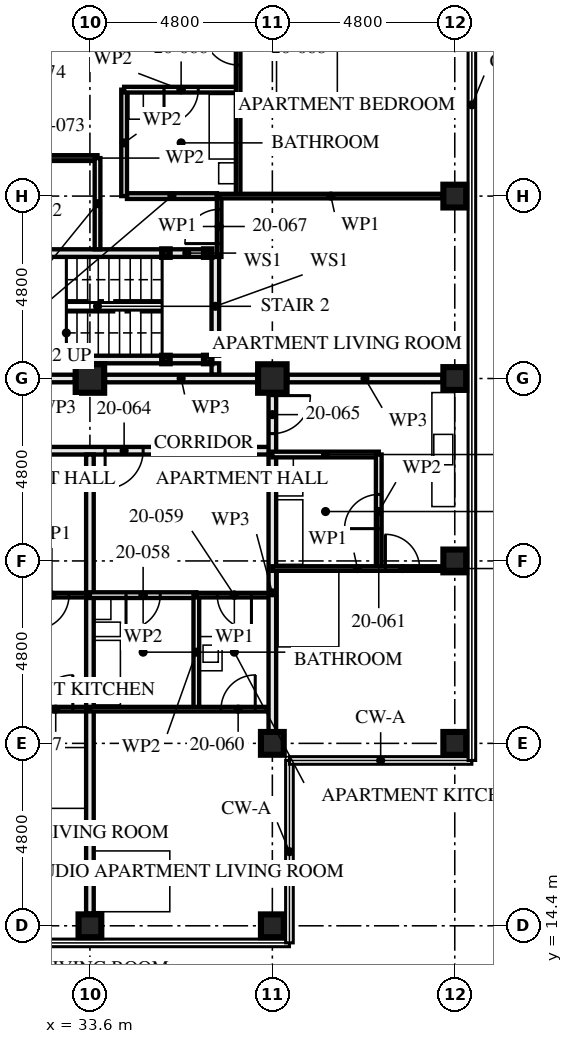
"""IFC4 building model, lengths in metres.
Left out: names, types, materials, properties, quantities, classifications, styles, units other than length and angle.
Written with IfcOpenShell. Run it as: python <this file> out.ifc"""

import sys

from ifc_helpers import new_model, si_unit, direction, frame, frame_2d, origin, origin_2d, place, context, subcontext, project, spatial, rectangle, hollow_rectangle, extrude, element, fill, save


model = new_model("IFC4")
c1 = context("Model", 3, precision=1e-05, world=origin(), true_north=direction((0.0, 1.0)))
c2 = subcontext(c1, "Body", "Model", "MODEL_VIEW")
j1 = project(units=[si_unit("LENGTHUNIT", "METRE"), si_unit("PLANEANGLEUNIT", "RADIAN")], contexts=[c1])
p1 = place(None, origin())
s1 = spatial("IfcSite", under=j1, at=p1, CompositionType="ELEMENT")
p2 = place(p1, origin())
s2 = spatial("IfcBuilding", under=s1, at=p2, CompositionType="ELEMENT")
p3 = place(p2, frame((0.0, 0.0, 76.0)))
s3 = spatial("IfcBuildingStorey", under=s2, at=p3, CompositionType="ELEMENT", Elevation=76.0)
p4 = place(p3, frame((33.6, 14.4, 0.0), z_axis=(0.0, 0.0, 1.0), x_axis=(0.0, 1.0, 0.0)))
e1 = element("IfcColumn", 1, at=p4, inside=s3, PredefinedType="COLUMN", context=c2, shape_type="SweptSolid", body=[
    extrude(hollow_rectangle(XDim=0.6, YDim=0.6, WallThickness=0.08, at=origin_2d()), origin(), (0.0, 0.0, 1.0), 3.5),
])
p5 = place(p3, frame((33.6, 28.8, 0.0), z_axis=(0.0, 0.0, 1.0), x_axis=(0.0, 1.0, 0.0)))
e2 = element("IfcColumn", 2, at=p5, inside=s3, PredefinedType="COLUMN", context=c2, shape_type="SweptSolid", body=[
    extrude(hollow_rectangle(XDim=0.75, YDim=0.75, WallThickness=0.08, at=origin_2d()), origin(), (0.0, 0.0, 1.0), 3.5),
])
for number, where, z_axis, x_axis in (
    (3, (38.4, 14.4, 0.0), (0.0, 0.0, 1.0), (0.0, 1.0, 0.0)),
    (4, (38.4, 19.2, 0.0), (0.0, 0.0, 1.0), (0.0, 1.0, 0.0)),
):
    element("IfcColumn", number, at=place(p3, frame(where, z_axis=z_axis, x_axis=x_axis)), inside=s3, PredefinedType="COLUMN", context=c2, shape_type="SweptSolid", body=[
        extrude(hollow_rectangle(XDim=0.6, YDim=0.6, WallThickness=0.08, at=origin_2d()), origin(), (0.0, 0.0, 1.0), 3.5),
    ])
p6 = place(p3, frame((38.4, 28.8, 0.0), z_axis=(0.0, 0.0, 1.0), x_axis=(0.0, 1.0, 0.0)))
e5 = element("IfcColumn", 5, at=p6, inside=s3, PredefinedType="COLUMN", context=c2, shape_type="SweptSolid", body=[
    extrude(hollow_rectangle(XDim=0.75, YDim=0.75, WallThickness=0.08, at=origin_2d()), origin(), (0.0, 0.0, 1.0), 3.5),
])
for number, where, z_axis, x_axis in (
    (6, (43.2, 19.2, 0.0), (0.0, 0.0, 1.0), (0.0, 1.0, 0.0)),
    (7, (43.2, 24.0, 0.0), (0.0, 0.0, 1.0), (1.0, 0.0, 0.0)),
    (8, (43.2, 28.8, 0.0), (0.0, 0.0, 1.0), (0.0, 1.0, 0.0)),
    (9, (43.2, 33.6, 0.0), (0.0, 0.0, 1.0), (1.0, 0.0, 0.0)),
):
    element("IfcColumn", number, at=place(p3, frame(where, z_axis=z_axis, x_axis=x_axis)), inside=s3, PredefinedType="COLUMN", context=c2, shape_type="SweptSolid", body=[
        extrude(hollow_rectangle(XDim=0.6, YDim=0.6, WallThickness=0.08, at=origin_2d()), origin(), (0.0, 0.0, 1.0), 3.5),
    ])
for number, where, z_axis, x_axis in (
    (10, (36.7, 29.3, 0.0), (0.0, 0.0, 1.0), (1.0, 0.0, 0.0)),
    (11, (36.7, 32.1, 0.0), (0.0, 0.0, 1.0), (1.0, 0.0, 0.0)),
    (12, (35.6, 29.3, 0.0), (0.0, 0.0, 1.0), (1.0, 0.0, 0.0)),
    (13, (35.6, 32.1, 0.0), (0.0, 0.0, 1.0), (1.0, 0.0, 0.0)),
):
    element("IfcColumn", number, at=place(p3, frame(where, z_axis=z_axis, x_axis=x_axis)), inside=s3, PredefinedType="COLUMN", context=c2, shape_type="SweptSolid", body=[
        extrude(hollow_rectangle(XDim=0.2, YDim=0.2, WallThickness=0.008, at=origin_2d()), origin(), (0.0, 0.0, 1.0), 3.25),
    ])
p7 = place(p3, frame((31.6, 23.1, 0.0), z_axis=(0.0, 0.0, 1.0), x_axis=(1.0, 0.0, 0.0)))
e14 = element("IfcWall", 14, at=p7, inside=s3, PredefinedType="PARTITIONING", context=c2, shape_type="SweptSolid", body=[
    extrude(rectangle(XDim=2.0, YDim=0.12, at=frame_2d((1.0, 0.0))), origin(), (0.0, 0.0, 1.0), 3.25),
])
p8 = place(p7, frame((0.55, 0.0, 0.0)))
e15 = element("IfcOpeningElement", 15, at=p8, cuts=e14, PredefinedType="OPENING", context=c2, shape_type="SweptSolid", body=[
    extrude(rectangle(XDim=0.9, YDim=2.1, at=frame_2d((0.45, 1.05))), frame((0.0, 0.071, 0.0), z_axis=(0.0, -1.0, 0.0), x_axis=(1.0, 0.0, 0.0)), (0.0, 0.0, 1.0), 0.141),
])
p9 = place(p3, frame((28.8, 20.1, 0.0), z_axis=(0.0, 0.0, 1.0), x_axis=(1.0, 0.0, 0.0)))
e16 = element("IfcWall", 16, at=p9, inside=s3, PredefinedType="PARTITIONING", context=c2, shape_type="SweptSolid", body=[
    extrude(rectangle(XDim=4.8, YDim=0.12, at=frame_2d((2.4, 0.0))), origin(), (0.0, 0.0, 1.0), 3.25),
])
p10 = place(p9, frame((3.45, 0.0, 0.0)))
e17 = element("IfcOpeningElement", 17, at=p10, cuts=e16, PredefinedType="OPENING", context=c2, shape_type="SweptSolid", body=[
    extrude(rectangle(XDim=0.9, YDim=2.1, at=frame_2d((0.45, 1.05))), frame((0.0, 0.071, 0.0), z_axis=(0.0, -1.0, 0.0), x_axis=(1.0, 0.0, 0.0)), (0.0, 0.0, 1.0), 0.141),
])
p11 = place(p3, frame((33.6, 14.72, 0.0), z_axis=(0.0, 0.0, 1.0), x_axis=(0.0, 1.0, 0.0)))
e18 = element("IfcWall", 18, at=p11, inside=s3, PredefinedType="PARTITIONING", context=c2, shape_type="SweptSolid", body=[
    extrude(rectangle(XDim=12.08, YDim=0.2, at=frame_2d((6.04, 0.0))), origin(), (0.0, 0.0, 1.0), 2.04),
])
p12 = place(p3, frame((36.4, 20.1, 0.0), z_axis=(0.0, 0.0, 1.0), x_axis=(0.0, 1.0, 0.0)))
e19 = element("IfcWall", 19, at=p12, inside=s3, PredefinedType="PARTITIONING", context=c2, shape_type="SweptSolid", body=[
    extrude(rectangle(XDim=3.0, YDim=0.15, at=frame_2d((1.5, 0.0))), origin(), (0.0, 0.0, 1.0), 3.25),
])
p13 = place(p3, frame((33.6, 23.1, 0.0), z_axis=(0.0, 0.0, 1.0), x_axis=(1.0, 0.0, 0.0)))
e20 = element("IfcWall", 20, at=p13, inside=s3, PredefinedType="PARTITIONING", context=c2, shape_type="SweptSolid", body=[
    extrude(rectangle(XDim=2.8, YDim=0.15, at=frame_2d((1.4, 0.0))), origin(), (0.0, 0.0, 1.0), 3.25),
])
p14 = place(p13, frame((0.95, 0.0, 0.0)))
e21 = element("IfcOpeningElement", 21, at=p14, cuts=e20, PredefinedType="OPENING", context=c2, shape_type="SweptSolid", body=[
    extrude(rectangle(XDim=0.9, YDim=2.1, at=frame_2d((0.45, 1.05))), frame((0.0, 0.085, 0.0), z_axis=(0.0, -1.0, 0.0), x_axis=(1.0, 0.0, 0.0)), (0.0, 0.0, 1.0), 0.171),
])
p15 = place(p3, frame((36.4, 23.1, 0.0), z_axis=(0.0, 0.0, 1.0), x_axis=(1.0, 0.0, 0.0)))
e22 = element("IfcWall", 22, at=p15, inside=s3, PredefinedType="PARTITIONING", context=c2, shape_type="SweptSolid", body=[
    extrude(rectangle(XDim=2.0, YDim=0.12, at=frame_2d((1.0, 0.0))), origin(), (0.0, 0.0, 1.0), 3.25),
])
p16 = place(p15, frame((0.55, 0.0, 0.0)))
e23 = element("IfcOpeningElement", 23, at=p16, cuts=e22, PredefinedType="OPENING", context=c2, shape_type="SweptSolid", body=[
    extrude(rectangle(XDim=0.9, YDim=2.1, at=frame_2d((0.45, 1.05))), frame((0.0, 0.071, 0.0), z_axis=(0.0, -1.0, 0.0), x_axis=(1.0, 0.0, 0.0)), (0.0, 0.0, 1.0), 0.141),
])
p17 = place(p3, frame((33.6, 20.1, 0.0), z_axis=(0.0, 0.0, 1.0), x_axis=(1.0, 0.0, 0.0)))
e24 = element("IfcWall", 24, at=p17, inside=s3, PredefinedType="PARTITIONING", context=c2, shape_type="SweptSolid", body=[
    extrude(rectangle(XDim=4.8, YDim=0.12, at=frame_2d((2.4, 0.0))), origin(), (0.0, 0.0, 1.0), 3.25),
])
p18 = place(p17, frame((3.45, 0.0, 0.0)))
e25 = element("IfcOpeningElement", 25, at=p18, cuts=e24, PredefinedType="OPENING", context=c2, shape_type="SweptSolid", body=[
    extrude(rectangle(XDim=0.9, YDim=2.1, at=frame_2d((0.45, 1.05))), frame((0.0, 0.071, 0.0), z_axis=(0.0, -1.0, 0.0), x_axis=(1.0, 0.0, 0.0)), (0.0, 0.0, 1.0), 0.141),
])
p19 = place(p3, frame((38.4, 19.52, 0.0), z_axis=(0.0, 0.0, 1.0), x_axis=(0.0, 1.0, 0.0)))
e26 = element("IfcWall", 26, at=p19, inside=s3, PredefinedType="PARTITIONING", context=c2, shape_type="SweptSolid", body=[
    extrude(rectangle(XDim=7.28, YDim=0.2, at=frame_2d((3.64, 0.0))), origin(), (0.0, 0.0, 1.0), 2.04),
])
p20 = place(p3, frame((41.2, 23.8, 0.0), z_axis=(0.0, 0.0, 1.0), x_axis=(0.0, 1.0, 0.0)))
e27 = element("IfcWall", 27, at=p20, inside=s3, PredefinedType="PARTITIONING", context=c2, shape_type="SweptSolid", body=[
    extrude(rectangle(XDim=3.0, YDim=0.15, at=frame_2d((1.5, 0.0))), origin(), (0.0, 0.0, 1.0), 2.04),
])
p21 = place(p20, frame((1.05, 0.0, 0.0)))
e28 = element("IfcOpeningElement", 28, at=p21, cuts=e27, PredefinedType="OPENING", context=c2, shape_type="SweptSolid", body=[
    extrude(rectangle(XDim=0.9, YDim=2.0, at=frame_2d((0.45, 1.0))), frame((0.0, 0.085, 0.0), z_axis=(0.0, -1.0, 0.0), x_axis=(1.0, 0.0, 0.0)), (0.0, 0.0, 1.0), 0.171),
])
p22 = place(p3, frame((38.4, 26.8, 0.0), z_axis=(0.0, 0.0, 1.0), x_axis=(1.0, 0.0, 0.0)))
e29 = element("IfcWall", 29, at=p22, inside=s3, PredefinedType="PARTITIONING", context=c2, shape_type="SweptSolid", body=[
    extrude(rectangle(XDim=2.8, YDim=0.15, at=frame_2d((1.4, 0.0))), origin(), (0.0, 0.0, 1.0), 3.25),
])
p23 = place(p3, frame((38.4, 23.8, 0.0), z_axis=(0.0, 0.0, 1.0), x_axis=(1.0, 0.0, 0.0)))
e30 = element("IfcWall", 30, at=p23, inside=s3, PredefinedType="PARTITIONING", context=c2, shape_type="SweptSolid", body=[
    extrude(rectangle(XDim=4.48, YDim=0.12, at=frame_2d((2.24, 0.0))), origin(), (0.0, 0.0, 1.0), 2.04),
])
p24 = place(p23, frame((2.975, 0.0, 0.0)))
e31 = element("IfcOpeningElement", 31, at=p24, cuts=e30, PredefinedType="OPENING", context=c2, shape_type="SweptSolid", body=[
    extrude(rectangle(XDim=0.9, YDim=2.0, at=frame_2d((0.45, 1.0))), frame((0.0, 0.071, 0.0), z_axis=(0.0, -1.0, 0.0), x_axis=(1.0, 0.0, 0.0)), (0.0, 0.0, 1.0), 0.141),
])
p25 = place(p3, frame((28.8, 26.9, 0.0), z_axis=(0.0, 0.0, 1.0), x_axis=(1.0, 0.0, 0.0)))
e32 = element("IfcWall", 32, at=p25, inside=s3, PredefinedType="PARTITIONING", context=c2, shape_type="SweptSolid", body=[
    extrude(rectangle(XDim=9.6, YDim=0.2, at=frame_2d((4.8, 0.0))), origin(), (0.0, 0.0, 1.0), 3.25),
])
p26 = place(p25, frame((0.4, 0.0, 0.0)))
e33 = element("IfcOpeningElement", 33, at=p26, cuts=e32, PredefinedType="OPENING", context=c2, shape_type="SweptSolid", body=[
    extrude(rectangle(XDim=1.0, YDim=2.1, at=frame_2d((0.5, 1.05))), frame((0.0, 0.111, 0.0), z_axis=(0.0, -1.0, 0.0), x_axis=(1.0, 0.0, 0.0)), (0.0, 0.0, 1.0), 0.221),
])
p27 = place(p25, frame((5.2, 0.0, 0.0)))
e34 = element("IfcOpeningElement", 34, at=p27, cuts=e32, PredefinedType="OPENING", context=c2, shape_type="SweptSolid", body=[
    extrude(rectangle(XDim=1.0, YDim=2.1, at=frame_2d((0.5, 1.05))), frame((0.0, 0.111, 0.0), z_axis=(0.0, -1.0, 0.0), x_axis=(1.0, 0.0, 0.0)), (0.0, 0.0, 1.0), 0.221),
])
p28 = place(p3, frame((38.4, 26.8, 0.0), z_axis=(0.0, 0.0, 1.0), x_axis=(0.0, 1.0, 0.0)))
e35 = element("IfcWall", 35, at=p28, inside=s3, PredefinedType="PARTITIONING", context=c2, shape_type="SweptSolid", body=[
    extrude(rectangle(XDim=1.605, YDim=0.2, at=frame_2d((0.802, 0.0))), origin(), (0.0, 0.0, 1.0), 3.25),
])
p29 = place(p28, frame((0.55, 0.0, 0.0)))
e36 = element("IfcOpeningElement", 36, at=p29, cuts=e35, PredefinedType="OPENING", context=c2, shape_type="SweptSolid", body=[
    extrude(rectangle(XDim=1.0, YDim=2.1, at=frame_2d((0.5, 1.05))), frame((0.0, 0.111, 0.0), z_axis=(0.0, -1.0, 0.0), x_axis=(1.0, 0.0, 0.0)), (0.0, 0.0, 1.0), 0.221),
])
p30 = place(p3, frame((36.6, 29.3, 0.0), z_axis=(0.0, 0.0, 1.0), x_axis=(-1.0, 0.0, 0.0)))
e37 = element("IfcWall", 37, at=p30, inside=s3, PredefinedType="SOLIDWALL", context=c2, shape_type="SweptSolid", body=[
    extrude(rectangle(XDim=0.9, YDim=0.2, at=frame_2d((0.45, 0.0))), origin(), (0.0, 0.0, 1.0), 2.94),
])
p31 = place(p3, frame((35.5, 29.3, 0.0), z_axis=(0.0, 0.0, 1.0), x_axis=(-1.0, 0.0, 0.0)))
e38 = element("IfcWall", 38, at=p31, inside=s3, PredefinedType="SOLIDWALL", context=c2, shape_type="SweptSolid", body=[
    extrude(rectangle(XDim=4.7, YDim=0.2, at=frame_2d((2.35, 0.0))), origin(), (0.0, 0.0, 1.0), 2.94),
])
p32 = place(p3, frame((36.6, 32.1, 0.0), z_axis=(0.0, 0.0, 1.0), x_axis=(-1.0, 0.0, 0.0)))
e39 = element("IfcWall", 39, at=p32, inside=s3, PredefinedType="SOLIDWALL", context=c2, shape_type="SweptSolid", body=[
    extrude(rectangle(XDim=0.9, YDim=0.2, at=frame_2d((0.45, 0.0))), origin(), (0.0, 0.0, 1.0), 2.94),
])
p33 = place(p3, frame((35.5, 32.1, 0.0), z_axis=(0.0, 0.0, 1.0), x_axis=(-1.0, 0.0, 0.0)))
e40 = element("IfcWall", 40, at=p33, inside=s3, PredefinedType="SOLIDWALL", context=c2, shape_type="SweptSolid", body=[
    extrude(rectangle(XDim=4.7, YDim=0.2, at=frame_2d((2.35, 0.0))), origin(), (0.0, 0.0, 1.0), 2.94),
])
p34 = place(p3, frame((36.9, 28.9, 0.0), z_axis=(0.0, 0.0, 1.0), x_axis=(0.0, 1.0, 0.0)))
e41 = element("IfcWall", 41, at=p34, inside=s3, PredefinedType="SOLIDWALL", context=c2, shape_type="SweptSolid", body=[
    extrude(rectangle(XDim=0.3, YDim=0.2, at=frame_2d((0.15, 0.0))), origin(), (0.0, 0.0, 1.0), 3.25),
])
p35 = place(p3, frame((36.9, 29.4, 0.0), z_axis=(0.0, 0.0, 1.0), x_axis=(0.0, 1.0, 0.0)))
e42 = element("IfcWall", 42, at=p35, inside=s3, PredefinedType="SOLIDWALL", context=c2, shape_type="SweptSolid", body=[
    extrude(rectangle(XDim=2.6, YDim=0.2, at=frame_2d((1.3, 0.0))), origin(), (0.0, 0.0, 1.0), 3.25),
])
p36 = place(p3, frame((33.8, 32.2, 0.0), z_axis=(0.0, 0.0, 1.0), x_axis=(0.0, 1.0, 0.0)))
e43 = element("IfcWall", 43, at=p36, inside=s3, PredefinedType="PARTITIONING", context=c2, shape_type="SweptSolid", body=[
    extrude(rectangle(XDim=2.4, YDim=0.15, at=frame_2d((1.2, 0.0))), origin(), (0.0, 0.0, 1.0), 2.04),
])
p37 = place(p3, frame((33.8, 34.6, 0.0), z_axis=(0.0, 0.0, 1.0), x_axis=(-1.0, 0.0, 0.0)))
e44 = element("IfcWall", 44, at=p37, inside=s3, PredefinedType="PARTITIONING", context=c2, shape_type="SweptSolid", body=[
    extrude(rectangle(XDim=3.0, YDim=0.15, at=frame_2d((1.5, 0.0))), origin(), (0.0, 0.0, 1.0), 3.25),
])
p38 = place(p3, frame((37.5, 36.4, 0.0), z_axis=(0.0, 0.0, 1.0), x_axis=(-1.0, 0.0, 0.0)))
e45 = element("IfcWall", 45, at=p38, inside=s3, PredefinedType="PARTITIONING", context=c2, shape_type="SweptSolid", body=[
    extrude(rectangle(XDim=3.0, YDim=0.15, at=frame_2d((1.5, 0.0))), origin(), (0.0, 0.0, 1.0), 3.25),
])
p39 = place(p38, frame((1.05, 0.0, 0.0)))
e46 = element("IfcOpeningElement", 46, at=p39, cuts=e45, PredefinedType="OPENING", context=c2, shape_type="SweptSolid", body=[
    extrude(rectangle(XDim=0.9, YDim=2.1, at=frame_2d((0.45, 1.05))), frame((0.0, 0.085, 0.0), z_axis=(0.0, -1.0, 0.0), x_axis=(1.0, 0.0, 0.0)), (0.0, 0.0, 1.0), 0.171),
])
p40 = place(p3, frame((34.5, 33.6, 0.0), z_axis=(0.0, 0.0, 1.0), x_axis=(0.0, 1.0, 0.0)))
e47 = element("IfcWall", 47, at=p40, inside=s3, PredefinedType="PARTITIONING", context=c2, shape_type="SweptSolid", body=[
    extrude(rectangle(XDim=2.8, YDim=0.15, at=frame_2d((1.4, 0.0))), origin(), (0.0, 0.0, 1.0), 3.25),
])
p41 = place(p3, frame((37.0, 32.0, 0.0), z_axis=(0.0, 0.0, 1.0), x_axis=(0.0, 1.0, 0.0)))
e48 = element("IfcWall", 48, at=p41, inside=s3, PredefinedType="PARTITIONING", context=c2, shape_type="SweptSolid", body=[
    extrude(rectangle(XDim=1.6, YDim=0.12, at=frame_2d((0.8, 0.0))), origin(), (0.0, 0.0, 1.0), 3.25),
])
p42 = place(p41, frame((0.35, 0.0, 0.0)))
e49 = element("IfcOpeningElement", 49, at=p42, cuts=e48, PredefinedType="OPENING", context=c2, shape_type="SweptSolid", body=[
    extrude(rectangle(XDim=0.9, YDim=2.1, at=frame_2d((0.45, 1.05))), frame((0.0, 0.071, 0.0), z_axis=(0.0, -1.0, 0.0), x_axis=(1.0, 0.0, 0.0)), (0.0, 0.0, 1.0), 0.141),
])
p43 = place(p3, frame((37.5, 33.6, 0.0), z_axis=(0.0, 0.0, 1.0), x_axis=(0.0, 1.0, 0.0)))
e50 = element("IfcWall", 50, at=p43, inside=s3, PredefinedType="PARTITIONING", context=c2, shape_type="SweptSolid", body=[
    extrude(rectangle(XDim=4.8, YDim=0.12, at=frame_2d((2.4, 0.0))), origin(), (0.0, 0.0, 1.0), 3.25),
])
p44 = place(p43, frame((3.45, 0.0, 0.0)))
e51 = element("IfcOpeningElement", 51, at=p44, cuts=e50, PredefinedType="OPENING", context=c2, shape_type="SweptSolid", body=[
    extrude(rectangle(XDim=0.9, YDim=2.1, at=frame_2d((0.45, 1.05))), frame((0.0, 0.071, 0.0), z_axis=(0.0, -1.0, 0.0), x_axis=(1.0, 0.0, 0.0)), (0.0, 0.0, 1.0), 0.141),
])
p45 = place(p3, frame((42.88, 33.6, 0.0), z_axis=(0.0, 0.0, 1.0), x_axis=(-1.0, 0.0, 0.0)))
e52 = element("IfcWall", 52, at=p45, inside=s3, PredefinedType="PARTITIONING", context=c2, shape_type="SweptSolid", body=[
    extrude(rectangle(XDim=5.88, YDim=0.12, at=frame_2d((2.94, 0.0))), origin(), (0.0, 0.0, 1.0), 2.04),
])
p46 = place(p3, frame((42.88, 28.8, 0.0), z_axis=(0.0, 0.0, 1.0), x_axis=(-1.0, 0.0, 0.0)))
e53 = element("IfcWall", 53, at=p46, inside=s3, PredefinedType="PARTITIONING", context=c2, shape_type="SweptSolid", body=[
    extrude(rectangle(XDim=4.085, YDim=0.2, at=frame_2d((2.042, 0.0))), origin(), (0.0, 0.0, 1.0), 2.04),
])
p47 = place(p3, frame((38.005, 28.8, 0.0), z_axis=(0.0, 0.0, 1.0), x_axis=(-1.0, 0.0, 0.0)))
e54 = element("IfcWall", 54, at=p47, inside=s3, PredefinedType="PARTITIONING", context=c2, shape_type="SweptSolid", body=[
    extrude(rectangle(XDim=4.01, YDim=0.2, at=frame_2d((2.005, 0.0))), origin(), (0.0, 0.0, 1.0), 2.04),
])
p48 = place(p3, frame((33.205, 28.8, 0.0), z_axis=(0.0, 0.0, 1.0), x_axis=(-1.0, 0.0, 0.0)))
e55 = element("IfcWall", 55, at=p48, inside=s3, PredefinedType="PARTITIONING", context=c2, shape_type="SweptSolid", body=[
    extrude(rectangle(XDim=2.505, YDim=0.2, at=frame_2d((1.252, 0.0))), origin(), (0.0, 0.0, 1.0), 2.04),
])
p49 = place(p3, frame((36.94, 33.6, 0.0), z_axis=(0.0, 0.0, 1.0), x_axis=(-1.0, 0.0, 0.0)))
e56 = element("IfcWall", 56, at=p49, inside=s3, PredefinedType="PARTITIONING", context=c2, shape_type="SweptSolid", body=[
    extrude(rectangle(XDim=2.365, YDim=0.15, at=frame_2d((1.183, 0.0))), origin(), (0.0, 0.0, 1.0), 2.04),
])
p50 = place(p8, frame((0.9, 0.0, 0.0), z_axis=(0.0, 0.0, 1.0), x_axis=(-1.0, 0.0, 0.0)))
e57 = element("IfcDoor", 57, at=p50, inside=s3, OperationType="SINGLE_SWING_LEFT", PredefinedType="DOOR", context=c2, shape_type="SweptSolid", body=[
    extrude(rectangle(XDim=0.9, YDim=2.1, at=frame_2d((0.45, 1.05))), frame((0.0, 0.022, 0.0), z_axis=(0.0, -1.0, 0.0), x_axis=(1.0, 0.0, 0.0)), (0.0, 0.0, 1.0), 0.044),
])
fill(e15, e57)
p51 = place(p10, origin())
e58 = element("IfcDoor", 58, at=p51, inside=s3, OperationType="SINGLE_SWING_LEFT", PredefinedType="DOOR", context=c2, shape_type="SweptSolid", body=[
    extrude(rectangle(XDim=0.9, YDim=2.1, at=frame_2d((0.45, 1.05))), frame((0.0, 0.022, 0.0), z_axis=(0.0, -1.0, 0.0), x_axis=(1.0, 0.0, 0.0)), (0.0, 0.0, 1.0), 0.044),
])
fill(e17, e58)
p52 = place(p14, frame((0.9, 0.0, 0.0), z_axis=(0.0, 0.0, 1.0), x_axis=(-1.0, 0.0, 0.0)))
e59 = element("IfcDoor", 59, at=p52, inside=s3, OperationType="SINGLE_SWING_LEFT", PredefinedType="DOOR", context=c2, shape_type="SweptSolid", body=[
    extrude(rectangle(XDim=0.9, YDim=2.1, at=frame_2d((0.45, 1.05))), frame((0.0, 0.022, 0.0), z_axis=(0.0, -1.0, 0.0), x_axis=(1.0, 0.0, 0.0)), (0.0, 0.0, 1.0), 0.044),
])
fill(e21, e59)
p53 = place(p16, frame((0.9, 0.0, 0.0), z_axis=(0.0, 0.0, 1.0), x_axis=(-1.0, 0.0, 0.0)))
e60 = element("IfcDoor", 60, at=p53, inside=s3, OperationType="SINGLE_SWING_RIGHT", PredefinedType="DOOR", context=c2, shape_type="SweptSolid", body=[
    extrude(rectangle(XDim=0.9, YDim=2.1, at=frame_2d((0.45, 1.05))), frame((0.0, 0.022, 0.0), z_axis=(0.0, -1.0, 0.0), x_axis=(1.0, 0.0, 0.0)), (0.0, 0.0, 1.0), 0.044),
])
fill(e23, e60)
p54 = place(p18, origin())
e61 = element("IfcDoor", 61, at=p54, inside=s3, OperationType="SINGLE_SWING_LEFT", PredefinedType="DOOR", context=c2, shape_type="SweptSolid", body=[
    extrude(rectangle(XDim=0.9, YDim=2.1, at=frame_2d((0.45, 1.05))), frame((0.0, 0.022, 0.0), z_axis=(0.0, -1.0, 0.0), x_axis=(1.0, 0.0, 0.0)), (0.0, 0.0, 1.0), 0.044),
])
fill(e25, e61)
p55 = place(p21, origin())
e62 = element("IfcDoor", 62, at=p55, inside=s3, OperationType="SINGLE_SWING_RIGHT", PredefinedType="DOOR", context=c2, shape_type="SweptSolid", body=[
    extrude(rectangle(XDim=0.9, YDim=2.0, at=frame_2d((0.45, 1.0))), frame((0.0, 0.022, 0.0), z_axis=(0.0, -1.0, 0.0), x_axis=(1.0, 0.0, 0.0)), (0.0, 0.0, 1.0), 0.044),
])
fill(e28, e62)
p56 = place(p24, origin())
e63 = element("IfcDoor", 63, at=p56, inside=s3, OperationType="SINGLE_SWING_RIGHT", PredefinedType="DOOR", context=c2, shape_type="SweptSolid", body=[
    extrude(rectangle(XDim=0.9, YDim=2.0, at=frame_2d((0.45, 1.0))), frame((0.0, 0.022, 0.0), z_axis=(0.0, -1.0, 0.0), x_axis=(1.0, 0.0, 0.0)), (0.0, 0.0, 1.0), 0.044),
])
fill(e31, e63)
p57 = place(p27, frame((1.0, 0.0, 0.0), z_axis=(0.0, 0.0, 1.0), x_axis=(-1.0, 0.0, 0.0)))
e64 = element("IfcDoor", 64, at=p57, inside=s3, OperationType="SINGLE_SWING_LEFT", PredefinedType="DOOR", context=c2, shape_type="SweptSolid", body=[
    extrude(rectangle(XDim=1.0, YDim=2.1, at=frame_2d((0.5, 1.05))), frame((0.0, 0.027, 0.0), z_axis=(0.0, -1.0, 0.0), x_axis=(1.0, 0.0, 0.0)), (0.0, 0.0, 1.0), 0.054),
])
fill(e34, e64)
p58 = place(p29, frame((1.0, 0.0, 0.0), z_axis=(0.0, 0.0, 1.0), x_axis=(-1.0, 0.0, 0.0)))
e65 = element("IfcDoor", 65, at=p58, inside=s3, OperationType="SINGLE_SWING_RIGHT", PredefinedType="DOOR", context=c2, shape_type="SweptSolid", body=[
    extrude(rectangle(XDim=1.0, YDim=2.1, at=frame_2d((0.5, 1.05))), frame((0.0, 0.027, 0.0), z_axis=(0.0, -1.0, 0.0), x_axis=(1.0, 0.0, 0.0)), (0.0, 0.0, 1.0), 0.054),
])
fill(e36, e65)
p59 = place(p39, origin())
e66 = element("IfcDoor", 66, at=p59, inside=s3, OperationType="SINGLE_SWING_LEFT", PredefinedType="DOOR", context=c2, shape_type="SweptSolid", body=[
    extrude(rectangle(XDim=0.9, YDim=2.1, at=frame_2d((0.45, 1.05))), frame((0.0, 0.022, 0.0), z_axis=(0.0, -1.0, 0.0), x_axis=(1.0, 0.0, 0.0)), (0.0, 0.0, 1.0), 0.044),
])
fill(e46, e66)
p60 = place(p42, origin())
e67 = element("IfcDoor", 67, at=p60, inside=s3, OperationType="SINGLE_SWING_RIGHT", PredefinedType="DOOR", context=c2, shape_type="SweptSolid", body=[
    extrude(rectangle(XDim=0.9, YDim=2.1, at=frame_2d((0.45, 1.05))), frame((0.0, 0.022, 0.0), z_axis=(0.0, -1.0, 0.0), x_axis=(1.0, 0.0, 0.0)), (0.0, 0.0, 1.0), 0.044),
])
fill(e49, e67)
p61 = place(p44, origin())
e68 = element("IfcDoor", 68, at=p61, inside=s3, OperationType="SINGLE_SWING_LEFT", PredefinedType="DOOR", context=c2, shape_type="SweptSolid", body=[
    extrude(rectangle(XDim=0.9, YDim=2.1, at=frame_2d((0.45, 1.05))), frame((0.0, 0.022, 0.0), z_axis=(0.0, -1.0, 0.0), x_axis=(1.0, 0.0, 0.0)), (0.0, 0.0, 1.0), 0.044),
])
fill(e51, e68)
save(model, sys.argv[1])
